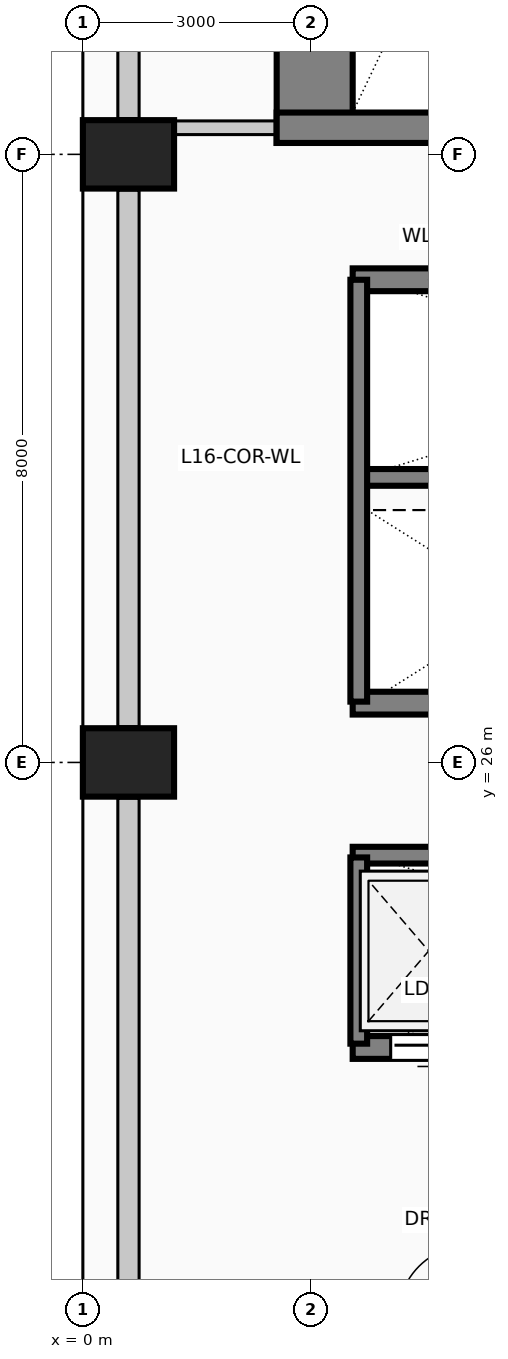
"""IFC4 building model, lengths in metres.
Left out: names, types, materials, properties, quantities, classifications, styles, units other than length and angle.
Written with IfcOpenShell. Run it as: python <this file> out.ifc"""

import sys

from ifc_helpers import new_model, si_unit, direction, frame, frame_2d, origin, origin_2d, place, context, subcontext, project, spatial, rectangle, extrude, element, fill, save


model = new_model("IFC4")
c1 = context("Model", 3, precision=1e-05, world=origin(), true_north=direction((0.0, 1.0)))
c2 = subcontext(c1, "Body", "Model", "MODEL_VIEW")
j1 = project(units=[si_unit("LENGTHUNIT", "METRE"), si_unit("PLANEANGLEUNIT", "RADIAN")], contexts=[c1])
p1 = place(None, origin())
s1 = spatial("IfcSite", under=j1, at=p1, CompositionType="ELEMENT")
p2 = place(p1, origin())
s2 = spatial("IfcBuilding", under=s1, at=p2, CompositionType="ELEMENT")
p3 = place(p2, frame((0.0, 0.0, 66.6)))
s3 = spatial("IfcBuildingStorey", under=s2, at=p3, CompositionType="ELEMENT", Elevation=66.6)
p4 = place(p3, frame((3.05, 34.15, 0.0), z_axis=(0.0, 0.0, 1.0), x_axis=(0.0, 1.0, 0.0)))
e1 = element("IfcWall", 1, at=p4, inside=s3, PredefinedType="SHEAR", context=c2, shape_type="SweptSolid", body=[
    extrude(rectangle(XDim=9.28, YDim=1.0, at=frame_2d((4.64, 0.0))), origin(), (0.0, 0.0, 1.0), 4.0),
])
p5 = place(p3, frame((2.55, 34.35, 0.0), z_axis=(0.0, 0.0, 1.0), x_axis=(1.0, 0.0, 0.0)))
e2 = element("IfcWall", 2, at=p5, inside=s3, PredefinedType="SHEAR", context=c2, shape_type="SweptSolid", body=[
    extrude(rectangle(XDim=5.16, YDim=0.4, at=frame_2d((2.58, 0.0))), origin(), (0.0, 0.0, 1.0), 4.0),
])
p6 = place(p5, frame((2.4, 0.0, 0.0)))
e3 = element("IfcOpeningElement", 3, at=p6, cuts=e2, PredefinedType="OPENING", context=c2, shape_type="SweptSolid", body=[
    extrude(rectangle(XDim=1.15, YDim=2.2, at=frame_2d((0.575, 1.1))), frame((0.0, 0.21, 0.0), z_axis=(0.0, -1.0, 0.0), x_axis=(1.0, 0.0, 0.0)), (0.0, 0.0, 1.0), 0.42),
])
for number, where, z_axis, x_axis in (
    (4, (0.6, 26.0, 0.0), (0.0, 0.0, 1.0), (0.0, 1.0, 0.0)),
    (5, (0.6, 34.0, 0.0), (0.0, 0.0, 1.0), (0.0, 1.0, 0.0)),
):
    element("IfcColumn", number, at=place(p3, frame(where, z_axis=z_axis, x_axis=x_axis)), inside=s3, PredefinedType="COLUMN", context=c2, shape_type="SweptSolid", body=[
        extrude(rectangle(XDim=0.9, YDim=1.2, at=origin_2d()), origin(), (0.0, 0.0, 1.0), 4.0),
    ])
for number, where, z_axis, x_axis in (
    (6, (0.6, 18.47, 0.0), (0.0, 0.0, 1.0), (0.0, 1.0, 0.0)),
    (7, (0.6, 26.47, 0.0), (0.0, 0.0, 1.0), (0.0, 1.0, 0.0)),
):
    element("IfcWall", number, at=place(p3, frame(where, z_axis=z_axis, x_axis=x_axis)), inside=s3, PredefinedType="SOLIDWALL", context=c2, shape_type="SweptSolid", body=[
        extrude(rectangle(XDim=7.06, YDim=0.28, at=frame_2d((3.53, 0.0))), origin(), (0.0, 0.0, 1.0), 2.85),
    ])
p7 = place(p3, frame((0.6, 34.47, 0.0), z_axis=(0.0, 0.0, 1.0), x_axis=(0.0, 1.0, 0.0)))
e8 = element("IfcWall", 8, at=p7, inside=s3, PredefinedType="SOLIDWALL", context=c2, shape_type="SweptSolid", body=[
    extrude(rectangle(XDim=7.46, YDim=0.28, at=frame_2d((3.73, 0.0))), origin(), (0.0, 0.0, 1.0), 2.85),
])
p8 = place(p3, frame((5.65, 22.25, 0.0), z_axis=(0.0, 0.0, 1.0), x_axis=(-1.0, 0.0, 0.0)))
e9 = element("IfcWall", 9, at=p8, inside=s3, PredefinedType="SOLIDWALL", context=c2, shape_type="SweptSolid", body=[
    extrude(rectangle(XDim=2.1, YDim=0.3, at=frame_2d((1.05, 0.0))), origin(), (0.0, 0.0, 1.0), 4.0),
])
p9 = place(p8, frame((0.5, 0.0, 0.0)))
e10 = element("IfcOpeningElement", 10, at=p9, cuts=e9, PredefinedType="OPENING", context=c2, shape_type="SweptSolid", body=[
    extrude(rectangle(XDim=1.1, YDim=2.2, at=frame_2d((0.55, 1.1))), frame((0.0, 0.16, 0.0), z_axis=(0.0, -1.0, 0.0), x_axis=(1.0, 0.0, 0.0)), (0.0, 0.0, 1.0), 0.32),
])
for number, where, z_axis, x_axis in (
    (11, (3.55, 32.35, 0.0), (0.0, 0.0, 1.0), (1.0, 0.0, 0.0)),
    (12, (5.65, 26.78, 0.0), (0.0, 0.0, 1.0), (-1.0, 0.0, 0.0)),
):
    element("IfcWall", number, at=place(p3, frame(where, z_axis=z_axis, x_axis=x_axis)), inside=s3, PredefinedType="SOLIDWALL", context=c2, shape_type="SweptSolid", body=[
        extrude(rectangle(XDim=2.1, YDim=0.3, at=frame_2d((1.05, 0.0))), origin(), (0.0, 0.0, 1.0), 4.0),
    ])
p10 = place(p3, frame((3.55, 29.75, 0.0), z_axis=(0.0, 0.0, 1.0), x_axis=(1.0, 0.0, 0.0)))
e13 = element("IfcWall", 13, at=p10, inside=s3, PredefinedType="SOLIDWALL", context=c2, shape_type="SweptSolid", body=[
    extrude(rectangle(XDim=8.65, YDim=0.22, at=frame_2d((4.325, 0.0))), origin(), (0.0, 0.0, 1.0), 4.0),
])
p11 = place(p3, frame((3.63, 26.8, 0.0), z_axis=(0.0, 0.0, 1.0), x_axis=(0.0, 1.0, 0.0)))
e14 = element("IfcWall", 14, at=p11, inside=s3, PredefinedType="SOLIDWALL", context=c2, shape_type="SweptSolid", body=[
    extrude(rectangle(XDim=5.55, YDim=0.22, at=frame_2d((2.775, 0.0))), origin(), (0.0, 0.0, 1.0), 4.0),
])
p12 = place(p3, frame((3.55, 24.78, 0.0), z_axis=(0.0, 0.0, 1.0), x_axis=(1.0, 0.0, 0.0)))
e15 = element("IfcWall", 15, at=p12, inside=s3, PredefinedType="SOLIDWALL", context=c2, shape_type="SweptSolid", body=[
    extrude(rectangle(XDim=8.65, YDim=0.22, at=frame_2d((4.325, 0.0))), origin(), (0.0, 0.0, 1.0), 4.0),
])
p13 = place(p3, frame((3.63, 22.3, 0.0), z_axis=(0.0, 0.0, 1.0), x_axis=(0.0, 1.0, 0.0)))
e16 = element("IfcWall", 16, at=p13, inside=s3, PredefinedType="SOLIDWALL", context=c2, shape_type="SweptSolid", body=[
    extrude(rectangle(XDim=2.45, YDim=0.22, at=frame_2d((1.225, 0.0))), origin(), (0.0, 0.0, 1.0), 4.0),
])
p14 = place(p3, frame((1.2, 34.35, 0.0), z_axis=(0.0, 0.0, 1.0), x_axis=(1.0, 0.0, 0.0)))
e17 = element("IfcWall", 17, at=p14, inside=s3, PredefinedType="PARTITIONING", context=c2, shape_type="SweptSolid", body=[
    extrude(rectangle(XDim=1.35, YDim=0.18, at=frame_2d((0.675, 0.0))), origin(), (0.0, 0.0, 1.0), 3.7),
])
p15 = place(p9, origin())
e18 = element("IfcDoor", 18, at=p15, inside=s3, OperationType="SLIDING_TO_LEFT", PredefinedType="DOOR", context=c2, shape_type="SweptSolid", body=[
    extrude(rectangle(XDim=1.1, YDim=2.2, at=frame_2d((0.55, 1.1))), frame((0.0, 0.025, 0.0), z_axis=(0.0, -1.0, 0.0), x_axis=(1.0, 0.0, 0.0)), (0.0, 0.0, 1.0), 0.05),
])
fill(e10, e18)
save(model, sys.argv[1])
